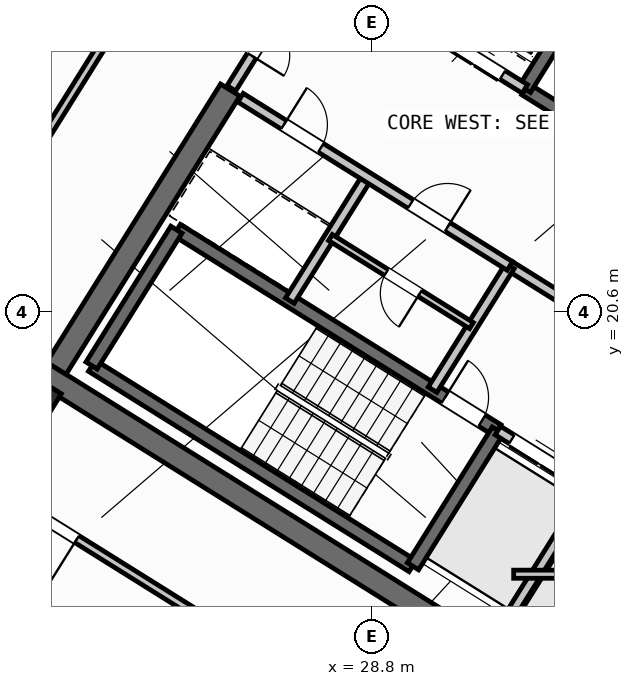
"""IFC4 building model, lengths in metres.
Left out: names, types, materials, properties, quantities, classifications, styles, units other than length and angle.
Written with IfcOpenShell. Run it as: python <this file> out.ifc"""

import sys

from ifc_helpers import new_model, si_unit, direction, frame, frame_2d, origin, origin_2d, place, context, subcontext, project, spatial, rectangle, hollow_rectangle, extrude, source, transform, mapped, element, fill, save


model = new_model("IFC4")
c1 = context("Model", 3, precision=1e-05, world=origin(), true_north=direction((0.0, 1.0)))
c2 = subcontext(c1, "Body", "Model", "MODEL_VIEW")
j1 = project(units=[si_unit("LENGTHUNIT", "METRE"), si_unit("PLANEANGLEUNIT", "RADIAN")], contexts=[c1])
p1 = place(None, origin())
s1 = spatial("IfcSite", under=j1, at=p1, CompositionType="ELEMENT")
p2 = place(p1, origin())
s2 = spatial("IfcBuilding", under=s1, at=p2, CompositionType="ELEMENT")
p3 = place(p2, frame((0.0, 0.0, 284.4)))
s3 = spatial("IfcBuildingStorey", under=s2, at=p3, CompositionType="ELEMENT", Elevation=284.4)
p4 = place(p3, frame((40.531, 24.036, 0.0), z_axis=(0.0, 0.0, 1.0), x_axis=(-0.848048787466, 0.529918157905, 0.0)))
e1 = element("IfcWall", 1, at=p4, inside=s3, PredefinedType="SHEAR", context=c2, shape_type="SweptSolid", body=[
    extrude(rectangle(XDim=13.04, YDim=0.45, at=frame_2d((6.52, 0.0))), origin(), (0.0, 0.0, 1.0), 3.35),
])
p5 = place(p3, frame((33.324, 12.503, 0.0), z_axis=(0.0, 0.0, 1.0), x_axis=(-0.848043529849, 0.529926571782, 0.0)))
e2 = element("IfcWall", 2, at=p5, inside=s3, PredefinedType="SHEAR", context=c2, shape_type="SweptSolid", body=[
    extrude(rectangle(XDim=13.04, YDim=0.45, at=frame_2d((6.52, 0.0))), origin(), (0.0, 0.0, 1.0), 3.35),
])
p6 = place(p3, frame((26.007, 24.976, 0.0), z_axis=(0.0, 0.0, 1.0), x_axis=(-0.529931155655, -0.848040665456, 0.0)))
e3 = element("IfcWall", 3, at=p6, inside=s3, PredefinedType="SHEAR", context=c2, shape_type="SweptSolid", body=[
    extrude(rectangle(XDim=6.475, YDim=0.45, at=frame_2d((3.238, 0.0))), origin(), (0.0, 0.0, 1.0), 3.35),
])
m1 = source(origin(), c2, "Body", "SweptSolid", [
    extrude(hollow_rectangle(XDim=0.7, YDim=0.7, WallThickness=0.028, at=origin_2d()), origin(), (0.0, 0.0, 1.0), 3.6),
])
p7 = place(p3, frame((22.191, 18.87, 0.0), z_axis=(0.0, 0.0, 1.0), x_axis=(-0.848048096156, 0.529919264233, 0.0)))
e4 = element("IfcColumn", 4, at=p7, inside=s3, PredefinedType="COLUMN", context=c2, shape_type="MappedRepresentation", body=[
    mapped(m1, transform((0.0, 0.0, 0.0), scale=1.0)),
])
p8 = place(p3, frame((29.268, 6.429, 0.0), z_axis=(0.0, 0.0, 1.0), x_axis=(-0.848048398186, 0.529918780885, 0.0)))
e5 = element("IfcWall", 5, at=p8, inside=s3, PredefinedType="STANDARD", context=c2, shape_type="SweptSolid", body=[
    extrude(rectangle(XDim=25.188, YDim=0.32, at=frame_2d((12.594, 0.0))), origin(), (0.0, 0.0, 1.0), 3.35),
])
p9 = place(p8, frame((16.362, 0.0, 0.0)))
e6 = element("IfcOpeningElement", 6, at=p9, cuts=e5, PredefinedType="OPENING", context=c2, shape_type="SweptSolid", body=[
    extrude(rectangle(XDim=1.2, YDim=2.15, at=frame_2d((0.6, 1.075))), frame((0.0, 0.17, 0.0), z_axis=(0.0, -1.0, 0.0), x_axis=(1.0, 0.0, 0.0)), (0.0, 0.0, 1.0), 0.34),
])
p10 = place(p8, frame((3.859, 0.0, 0.9)))
e7 = element("IfcOpeningElement", 7, at=p10, cuts=e5, PredefinedType="OPENING", context=c2, shape_type="SweptSolid", body=[
    extrude(rectangle(XDim=1.65, YDim=1.45, at=frame_2d((0.825, 0.725))), frame((0.0, 0.17, 0.0), z_axis=(0.0, -1.0, 0.0), x_axis=(1.0, 0.0, 0.0)), (0.0, 0.0, 1.0), 0.34),
])
p11 = place(p8, frame((10.519, 0.0, 0.9)))
e8 = element("IfcOpeningElement", 8, at=p11, cuts=e5, PredefinedType="OPENING", context=c2, shape_type="SweptSolid", body=[
    extrude(rectangle(XDim=1.65, YDim=1.45, at=frame_2d((0.825, 0.725))), frame((0.0, 0.17, 0.0), z_axis=(0.0, -1.0, 0.0), x_axis=(1.0, 0.0, 0.0)), (0.0, 0.0, 1.0), 0.34),
])
p12 = place(p8, frame((19.841, 0.0, 0.95)))
e9 = element("IfcOpeningElement", 9, at=p12, cuts=e5, PredefinedType="OPENING", context=c2, shape_type="SweptSolid", body=[
    extrude(rectangle(XDim=1.95, YDim=1.35, at=frame_2d((0.975, 0.675))), frame((0.0, 0.17, 0.0), z_axis=(0.0, -1.0, 0.0), x_axis=(1.0, 0.0, 0.0)), (0.0, 0.0, 1.0), 0.34),
])
p13 = place(p8, frame((23.478, 0.0, 1.0)))
e10 = element("IfcOpeningElement", 10, at=p13, cuts=e5, PredefinedType="OPENING", context=c2, shape_type="SweptSolid", body=[
    extrude(rectangle(XDim=0.9, YDim=1.25, at=frame_2d((0.45, 0.625))), frame((0.0, 0.17, 0.0), z_axis=(0.0, -1.0, 0.0), x_axis=(1.0, 0.0, 0.0)), (0.0, 0.0, 1.0), 0.34),
])
p14 = place(p3, frame((19.566, 38.434, 0.0), z_axis=(0.0, 0.0, 1.0), x_axis=(0.84804567626, -0.529923136858, 0.0)))
e11 = element("IfcWall", 11, at=p14, inside=s3, PredefinedType="STANDARD", context=c2, shape_type="SweptSolid", body=[
    extrude(rectangle(XDim=25.188, YDim=0.32, at=frame_2d((12.594, 0.0))), origin(), (0.0, 0.0, 1.0), 3.35),
])
p15 = place(p14, frame((3.355, 0.0, 0.0)))
e12 = element("IfcOpeningElement", 12, at=p15, cuts=e11, PredefinedType="OPENING", context=c2, shape_type="SweptSolid", body=[
    extrude(rectangle(XDim=1.05, YDim=2.15, at=frame_2d((0.525, 1.075))), frame((0.0, 0.17, 0.0), z_axis=(0.0, -1.0, 0.0), x_axis=(1.0, 0.0, 0.0)), (0.0, 0.0, 1.0), 0.34),
])
p16 = place(p14, frame((0.939, 0.0, 0.9)))
e13 = element("IfcOpeningElement", 13, at=p16, cuts=e11, PredefinedType="OPENING", context=c2, shape_type="SweptSolid", body=[
    extrude(rectangle(XDim=1.65, YDim=1.45, at=frame_2d((0.825, 0.725))), frame((0.0, 0.17, 0.0), z_axis=(0.0, -1.0, 0.0), x_axis=(1.0, 0.0, 0.0)), (0.0, 0.0, 1.0), 0.34),
])
p17 = place(p14, frame((7.499, 0.0, 0.9)))
e14 = element("IfcOpeningElement", 14, at=p17, cuts=e11, PredefinedType="OPENING", context=c2, shape_type="SweptSolid", body=[
    extrude(rectangle(XDim=1.35, YDim=1.45, at=frame_2d((0.675, 0.725))), frame((0.0, 0.17, 0.0), z_axis=(0.0, -1.0, 0.0), x_axis=(1.0, 0.0, 0.0)), (0.0, 0.0, 1.0), 0.34),
])
p18 = place(p14, frame((10.754, 0.0, 1.0)))
e15 = element("IfcOpeningElement", 15, at=p18, cuts=e11, PredefinedType="OPENING", context=c2, shape_type="SweptSolid", body=[
    extrude(rectangle(XDim=0.9, YDim=1.25, at=frame_2d((0.45, 0.625))), frame((0.0, 0.17, 0.0), z_axis=(0.0, -1.0, 0.0), x_axis=(1.0, 0.0, 0.0)), (0.0, 0.0, 1.0), 0.34),
])
p19 = place(p14, frame((15.694, 0.0, 1.0)))
e16 = element("IfcOpeningElement", 16, at=p19, cuts=e11, PredefinedType="OPENING", context=c2, shape_type="SweptSolid", body=[
    extrude(rectangle(XDim=0.9, YDim=1.25, at=frame_2d((0.45, 0.625))), frame((0.0, 0.17, 0.0), z_axis=(0.0, -1.0, 0.0), x_axis=(1.0, 0.0, 0.0)), (0.0, 0.0, 1.0), 0.34),
])
p20 = place(p14, frame((21.394, 0.0, 1.0)))
e17 = element("IfcOpeningElement", 17, at=p20, cuts=e11, PredefinedType="OPENING", context=c2, shape_type="SweptSolid", body=[
    extrude(rectangle(XDim=0.9, YDim=1.25, at=frame_2d((0.45, 0.625))), frame((0.0, 0.17, 0.0), z_axis=(0.0, -1.0, 0.0), x_axis=(1.0, 0.0, 0.0)), (0.0, 0.0, 1.0), 0.34),
])
p21 = place(p3, frame((29.605, 15.581, 0.0), z_axis=(0.0, 0.0, 1.0), x_axis=(-0.848036911448, 0.529937163087, 0.0)))
e18 = element("IfcWall", 18, at=p21, inside=s3, PredefinedType="SHEAR", context=c2, shape_type="SweptSolid", body=[
    extrude(rectangle(XDim=7.46, YDim=0.26, at=frame_2d((3.73, 0.0))), origin(), (0.0, 0.0, 1.0), 3.35),
])
p22 = place(p3, frame((31.28, 18.261, 0.0), z_axis=(0.0, 0.0, 1.0), x_axis=(-0.848051618787, 0.529913626805, 0.0)))
e19 = element("IfcWall", 19, at=p22, inside=s3, PredefinedType="SHEAR", context=c2, shape_type="SweptSolid", body=[
    extrude(rectangle(XDim=7.46, YDim=0.26, at=frame_2d((3.73, 0.0))), origin(), (0.0, 0.0, 1.0), 3.35),
])
p23 = place(p22, frame((0.36, 0.0, 0.0)))
e20 = element("IfcOpeningElement", 20, at=p23, cuts=e19, PredefinedType="OPENING", context=c2, shape_type="SweptSolid", body=[
    extrude(rectangle(XDim=0.86, YDim=2.05, at=frame_2d((0.43, 1.025))), frame((0.0, 0.14, 0.0), z_axis=(0.0, -1.0, 0.0), x_axis=(1.0, 0.0, 0.0)), (0.0, 0.0, 1.0), 0.28),
])
p24 = place(p3, frame((31.288, 18.256, 0.0), z_axis=(0.0, 0.0, 1.0), x_axis=(-0.529943379326, -0.848033026897, 0.0)))
e21 = element("IfcWall", 21, at=p24, inside=s3, PredefinedType="SHEAR", context=c2, shape_type="SweptSolid", body=[
    extrude(rectangle(XDim=3.16, YDim=0.26, at=frame_2d((1.58, 0.0))), origin(), (0.0, 0.0, 1.0), 3.35),
])
p25 = place(p3, frame((24.945, 22.22, 0.0), z_axis=(0.0, 0.0, 1.0), x_axis=(-0.529908658664, -0.84805472316, 0.0)))
e22 = element("IfcWall", 22, at=p25, inside=s3, PredefinedType="SHEAR", context=c2, shape_type="SweptSolid", body=[
    extrude(rectangle(XDim=3.16, YDim=0.26, at=frame_2d((1.58, 0.0))), origin(), (0.0, 0.0, 1.0), 3.35),
])
p26 = place(p3, frame((38.046, 21.108, 0.0), z_axis=(0.0, 0.0, 1.0), x_axis=(-0.848054434086, 0.529909121291, 0.0)))
e23 = element("IfcWall", 23, at=p26, inside=s3, PredefinedType="SHEAR", context=c2, shape_type="SweptSolid", body=[
    extrude(rectangle(XDim=7.33, YDim=0.26, at=frame_2d((3.665, 0.0))), origin(), (0.0, 0.0, 1.0), 3.35),
])
p27 = place(p26, frame((0.22, 0.0, 0.0)))
e24 = element("IfcOpeningElement", 24, at=p27, cuts=e23, PredefinedType="OPENING", context=c2, shape_type="SweptSolid", body=[
    extrude(rectangle(XDim=1.1, YDim=2.1, at=frame_2d((0.55, 1.05))), frame((0.0, 0.14, 0.0), z_axis=(0.0, -1.0, 0.0), x_axis=(1.0, 0.0, 0.0)), (0.0, 0.0, 1.0), 0.28),
])
p28 = place(p3, frame((33.496, 27.677, 0.0), z_axis=(0.0, 0.0, 1.0), x_axis=(-0.529908658664, -0.84805472316, 0.0)))
e25 = element("IfcWall", 25, at=p28, inside=s3, PredefinedType="SHEAR", context=c2, shape_type="SweptSolid", body=[
    extrude(rectangle(XDim=3.16, YDim=0.26, at=frame_2d((1.58, 0.0))), origin(), (0.0, 0.0, 1.0), 3.35),
])
p29 = place(p3, frame((34.933, 15.978, 0.0), z_axis=(0.0, 0.0, 1.0), x_axis=(-0.848055739377, 0.529907032327, 0.0)))
e26 = element("IfcWall", 26, at=p29, inside=s3, PredefinedType="STANDARD", context=c2, shape_type="SweptSolid", body=[
    extrude(rectangle(XDim=4.298, YDim=0.2, at=frame_2d((2.149, 0.0))), origin(), (0.0, 0.0, 1.0), 3.34),
])
p30 = place(p29, frame((0.448, 0.0, 0.0)))
e27 = element("IfcOpeningElement", 27, at=p30, cuts=e26, PredefinedType="OPENING", context=c2, shape_type="SweptSolid", body=[
    extrude(rectangle(XDim=1.3, YDim=2.2, at=frame_2d((0.65, 1.1))), frame((0.0, 0.11, 0.0), z_axis=(0.0, -1.0, 0.0), x_axis=(1.0, 0.0, 0.0)), (0.0, 0.0, 1.0), 0.22),
])
p31 = place(p29, frame((2.523, 0.0, 0.0)))
e28 = element("IfcOpeningElement", 28, at=p31, cuts=e26, PredefinedType="OPENING", context=c2, shape_type="SweptSolid", body=[
    extrude(rectangle(XDim=1.45, YDim=2.25, at=frame_2d((0.725, 1.125))), frame((0.0, 0.11, 0.0), z_axis=(0.0, -1.0, 0.0), x_axis=(1.0, 0.0, 0.0)), (0.0, 0.0, 1.0), 0.22),
])
p32 = place(p3, frame((36.459, 18.421, 0.0), z_axis=(0.0, 0.0, 1.0), x_axis=(-0.848059591691, 0.529900867089, 0.0)))
e29 = element("IfcWall", 29, at=p32, inside=s3, PredefinedType="STANDARD", context=c2, shape_type="SweptSolid", body=[
    extrude(rectangle(XDim=5.818, YDim=0.2, at=frame_2d((2.909, 0.0))), origin(), (0.0, 0.0, 1.0), 3.34),
])
p33 = place(p32, frame((2.598, 0.0, 0.0)))
e30 = element("IfcOpeningElement", 30, at=p33, cuts=e29, PredefinedType="OPENING", context=c2, shape_type="SweptSolid", body=[
    extrude(rectangle(XDim=1.15, YDim=2.1, at=frame_2d((0.575, 1.05))), frame((0.0, 0.11, 0.0), z_axis=(0.0, -1.0, 0.0), x_axis=(1.0, 0.0, 0.0)), (0.0, 0.0, 1.0), 0.22),
])
p34 = place(p3, frame((31.822, 24.998, 0.0), z_axis=(0.0, 0.0, 1.0), x_axis=(-0.848054125777, 0.529909614701, 0.0)))
e31 = element("IfcWall", 31, at=p34, inside=s3, PredefinedType="STANDARD", context=c2, shape_type="SweptSolid", body=[
    extrude(rectangle(XDim=4.668, YDim=0.2, at=frame_2d((2.334, 0.0))), origin(), (0.0, 0.0, 1.0), 3.34),
])
p35 = place(p34, frame((0.52, 0.0, 0.0)))
e32 = element("IfcOpeningElement", 32, at=p35, cuts=e31, PredefinedType="OPENING", context=c2, shape_type="SweptSolid", body=[
    extrude(rectangle(XDim=1.2, YDim=2.15, at=frame_2d((0.6, 1.075))), frame((0.0, 0.11, 0.0), z_axis=(0.0, -1.0, 0.0), x_axis=(1.0, 0.0, 0.0)), (0.0, 0.0, 1.0), 0.22),
])
p36 = place(p34, frame((2.54, 0.0, 0.0)))
e33 = element("IfcOpeningElement", 33, at=p36, cuts=e31, PredefinedType="OPENING", context=c2, shape_type="SweptSolid", body=[
    extrude(rectangle(XDim=1.2, YDim=2.15, at=frame_2d((0.6, 1.075))), frame((0.0, 0.11, 0.0), z_axis=(0.0, -1.0, 0.0), x_axis=(1.0, 0.0, 0.0)), (0.0, 0.0, 1.0), 0.22),
])
p37 = place(p3, frame((33.029, 17.003, 0.0), z_axis=(0.0, 0.0, 1.0), x_axis=(-0.529916267533, -0.848049968695, 0.0)))
e34 = element("IfcWall", 34, at=p37, inside=s3, PredefinedType="STANDARD", context=c2, shape_type="SweptSolid", body=[
    extrude(rectangle(XDim=2.92, YDim=0.2, at=frame_2d((1.46, 0.0))), origin(), (0.0, 0.0, 1.0), 3.34),
])
for number, where, z_axis, x_axis in (
    (35, (31.525, 21.504, 0.0), (0.0, 0.0, 1.0), (-0.53, -0.848, 0.0)),
    (36, (28.71, 23.263, 0.0), (0.0, 0.0, 1.0), (-0.53, -0.848, 0.0)),
):
    element("IfcWall", number, at=place(p3, frame(where, z_axis=z_axis, x_axis=x_axis)), inside=s3, PredefinedType="STANDARD", context=c2, shape_type="SweptSolid", body=[
        extrude(rectangle(XDim=2.88, YDim=0.2, at=frame_2d((1.44, 0.0))), origin(), (0.0, 0.0, 1.0), 3.34),
    ])
p38 = place(p3, frame((31.525, 21.504, 0.0), z_axis=(0.0, 0.0, 1.0), x_axis=(-0.848042066329, 0.529928913853, 0.0)))
e37 = element("IfcWall", 37, at=p38, inside=s3, PredefinedType="STANDARD", context=c2, shape_type="SweptSolid", body=[
    extrude(rectangle(XDim=6.268, YDim=0.2, at=frame_2d((3.134, 0.0))), origin(), (0.0, 0.0, 1.0), 3.34),
])
p39 = place(p38, frame((4.4, 0.0, 0.0)))
e38 = element("IfcOpeningElement", 38, at=p39, cuts=e37, PredefinedType="OPENING", context=c2, shape_type="SweptSolid", body=[
    extrude(rectangle(XDim=0.86, YDim=2.05, at=frame_2d((0.43, 1.025))), frame((0.0, 0.11, 0.0), z_axis=(0.0, -1.0, 0.0), x_axis=(1.0, 0.0, 0.0)), (0.0, 0.0, 1.0), 0.22),
])
p40 = place(p38, frame((1.45, 0.0, 0.0)))
e39 = element("IfcOpeningElement", 39, at=p40, cuts=e37, PredefinedType="OPENING", context=c2, shape_type="SweptSolid", body=[
    extrude(rectangle(XDim=0.86, YDim=2.05, at=frame_2d((0.43, 1.025))), frame((0.0, 0.11, 0.0), z_axis=(0.0, -1.0, 0.0), x_axis=(1.0, 0.0, 0.0)), (0.0, 0.0, 1.0), 0.22),
])
p41 = place(p3, frame((30.766, 20.327, 0.0), z_axis=(0.0, 0.0, 1.0), x_axis=(-0.848052663127, 0.529911955482, 0.0)))
e40 = element("IfcWall", 40, at=p41, inside=s3, PredefinedType="PLUMBINGWALL", context=c2, shape_type="SweptSolid", body=[
    extrude(rectangle(XDim=3.28, YDim=0.14, at=frame_2d((1.64, 0.0))), origin(), (0.0, 0.0, 1.0), 3.34),
])
p42 = place(p41, frame((1.2, 0.0, 0.0)))
e41 = element("IfcOpeningElement", 41, at=p42, cuts=e40, PredefinedType="OPENING", context=c2, shape_type="SweptSolid", body=[
    extrude(rectangle(XDim=0.78, YDim=2.05, at=frame_2d((0.39, 1.025))), frame((0.0, 0.08, 0.0), z_axis=(0.0, -1.0, 0.0), x_axis=(1.0, 0.0, 0.0)), (0.0, 0.0, 1.0), 0.16),
])
p43 = place(p3, frame((27.596, 27.52, 0.0), z_axis=(0.0, 0.0, 1.0), x_axis=(-0.529865479138, -0.848081702443, 0.0)))
e42 = element("IfcWall", 42, at=p43, inside=s3, PredefinedType="STANDARD", context=c2, shape_type="SweptSolid", body=[
    extrude(rectangle(XDim=2.96, YDim=0.2, at=frame_2d((1.48, 0.0))), origin(), (0.0, 0.0, 1.0), 3.34),
])
p44 = place(p43, frame((0.7, 0.0, 0.0)))
e43 = element("IfcOpeningElement", 43, at=p44, cuts=e42, PredefinedType="OPENING", context=c2, shape_type="SweptSolid", body=[
    extrude(rectangle(XDim=1.5, YDim=2.15, at=frame_2d((0.75, 1.075))), frame((0.0, 0.11, 0.0), z_axis=(0.0, -1.0, 0.0), x_axis=(1.0, 0.0, 0.0)), (0.0, 0.0, 1.0), 0.22),
])
p45 = place(p3, frame((25.807, 29.582, 0.0), z_axis=(0.0, 0.0, 1.0), x_axis=(-0.529918119251, -0.84804881162, 0.0)))
e44 = element("IfcWall", 44, at=p45, inside=s3, PredefinedType="PARTITIONING", context=c2, shape_type="SweptSolid", body=[
    extrude(rectangle(XDim=17.65, YDim=0.16, at=frame_2d((8.825, 0.0))), origin(), (0.0, 0.0, 1.0), 3.34),
])
p46 = place(p3, frame((32.164, 10.374, 0.0), z_axis=(0.0, 0.0, 1.0), x_axis=(-0.848044107957, 0.529925646633, 0.0)))
e45 = element("IfcWall", 45, at=p46, inside=s3, PredefinedType="PARTITIONING", context=c2, shape_type="SweptSolid", body=[
    extrude(rectangle(XDim=15.57, YDim=0.16, at=frame_2d((7.785, 0.0))), origin(), (0.0, 0.0, 1.0), 3.34),
])
p47 = place(p46, frame((10.83, 0.0, 0.0)))
e46 = element("IfcOpeningElement", 46, at=p47, cuts=e45, PredefinedType="OPENING", context=c2, shape_type="SweptSolid", body=[
    extrude(rectangle(XDim=1.0, YDim=2.1, at=frame_2d((0.5, 1.05))), frame((0.0, 0.09, 0.0), z_axis=(0.0, -1.0, 0.0), x_axis=(1.0, 0.0, 0.0)), (0.0, 0.0, 1.0), 0.18),
])
p48 = place(p3, frame((29.72, 8.859, 0.0), z_axis=(0.0, 0.0, 1.0), x_axis=(-0.848049134363, 0.529917602752, 0.0)))
e47 = element("IfcWall", 47, at=p48, inside=s3, PredefinedType="PLUMBINGWALL", context=c2, shape_type="SweptSolid", body=[
    extrude(rectangle(XDim=14.3, YDim=0.14, at=frame_2d((7.15, 0.0))), origin(), (0.0, 0.0, 1.0), 3.34),
])
p49 = place(p48, frame((9.57, 0.0, 0.0)))
e48 = element("IfcOpeningElement", 48, at=p49, cuts=e47, PredefinedType="OPENING", context=c2, shape_type="SweptSolid", body=[
    extrude(rectangle(XDim=0.92, YDim=2.08, at=frame_2d((0.46, 1.04))), frame((0.0, 0.08, 0.0), z_axis=(0.0, -1.0, 0.0), x_axis=(1.0, 0.0, 0.0)), (0.0, 0.0, 1.0), 0.16),
])
p50 = place(p3, frame((31.6, 15.42, 0.0), z_axis=(0.0, 0.0, 1.0), x_axis=(1.0, 0.0, 0.0)))
e49 = element("IfcWall", 49, at=p50, inside=s3, PredefinedType="PARTITIONING", context=c2, shape_type="SweptSolid", body=[
    extrude(rectangle(XDim=2.984, YDim=0.16, at=frame_2d((1.492, 0.0))), origin(), (0.0, 0.0, 1.0), 3.34),
])
m2 = source(origin(), c2, "Body", "SweptSolid", [
    extrude(rectangle(XDim=0.86, YDim=2.05, at=frame_2d((0.43, 1.025))), frame((0.0, 0.025, 0.0), z_axis=(0.0, -1.0, 0.0), x_axis=(1.0, 0.0, 0.0)), (0.0, 0.0, 1.0), 0.05),
])
p51 = place(p23, frame((0.86, 0.0, 0.0), z_axis=(0.0, 0.0, 1.0), x_axis=(-1.0, 0.0, 0.0)))
e50 = element("IfcDoor", 50, at=p51, inside=s3, OperationType="SINGLE_SWING_LEFT", PredefinedType="DOOR", context=c2, shape_type="MappedRepresentation", body=[
    mapped(m2, transform((0.0, 0.0, 0.0), scale=1.0)),
])
fill(e20, e50)
m3 = source(origin(), c2, "Body", "SweptSolid", [
    extrude(rectangle(XDim=1.45, YDim=2.25, at=frame_2d((0.725, 1.125))), frame((0.0, 0.025, 0.0), z_axis=(0.0, -1.0, 0.0), x_axis=(1.0, 0.0, 0.0)), (0.0, 0.0, 1.0), 0.05),
])
p52 = place(p31, origin())
e51 = element("IfcDoor", 51, at=p52, inside=s3, OperationType="DOUBLE_DOOR_SLIDING", PredefinedType="DOOR", context=c2, shape_type="MappedRepresentation", body=[
    mapped(m3, transform((0.0, 0.0, 0.0), scale=1.0)),
])
fill(e28, e51)
m4 = source(origin(), c2, "Body", "SweptSolid", [
    extrude(rectangle(XDim=1.2, YDim=2.15, at=frame_2d((0.6, 1.075))), frame((0.0, 0.025, 0.0), z_axis=(0.0, -1.0, 0.0), x_axis=(1.0, 0.0, 0.0)), (0.0, 0.0, 1.0), 0.05),
])
p53 = place(p35, origin())
e52 = element("IfcDoor", 52, at=p53, inside=s3, OperationType="DOUBLE_DOOR_SLIDING", PredefinedType="DOOR", context=c2, shape_type="MappedRepresentation", body=[
    mapped(m4, transform((0.0, 0.0, 0.0), scale=1.0)),
])
fill(e32, e52)
p54 = place(p39, frame((0.86, 0.0, 0.0), z_axis=(0.0, 0.0, 1.0), x_axis=(-1.0, 0.0, 0.0)))
e53 = element("IfcDoor", 53, at=p54, inside=s3, OperationType="SINGLE_SWING_LEFT", PredefinedType="DOOR", context=c2, shape_type="MappedRepresentation", body=[
    mapped(m2, transform((0.0, 0.0, 0.0), scale=1.0)),
])
fill(e38, e53)
p55 = place(p40, frame((0.86, 0.0, 0.0), z_axis=(0.0, 0.0, 1.0), x_axis=(-1.0, 0.0, 0.0)))
e54 = element("IfcDoor", 54, at=p55, inside=s3, OperationType="SINGLE_SWING_RIGHT", PredefinedType="DOOR", context=c2, shape_type="MappedRepresentation", body=[
    mapped(m2, transform((0.0, 0.0, 0.0), scale=1.0)),
])
fill(e39, e54)
m5 = source(origin(), c2, "Body", "SweptSolid", [
    extrude(rectangle(XDim=0.78, YDim=2.05, at=frame_2d((0.39, 1.025))), frame((0.0, 0.025, 0.0), z_axis=(0.0, -1.0, 0.0), x_axis=(1.0, 0.0, 0.0)), (0.0, 0.0, 1.0), 0.05),
])
p56 = place(p42, origin())
e55 = element("IfcDoor", 55, at=p56, inside=s3, OperationType="SINGLE_SWING_LEFT", PredefinedType="DOOR", context=c2, shape_type="MappedRepresentation", body=[
    mapped(m5, transform((0.0, 0.0, 0.0), scale=1.0)),
])
fill(e41, e55)
m6 = source(origin(), c2, "Body", "SweptSolid", [
    extrude(rectangle(XDim=1.5, YDim=2.15, at=frame_2d((0.75, 1.075))), frame((0.0, 0.025, 0.0), z_axis=(0.0, -1.0, 0.0), x_axis=(1.0, 0.0, 0.0)), (0.0, 0.0, 1.0), 0.05),
])
p57 = place(p44, origin())
e56 = element("IfcDoor", 56, at=p57, inside=s3, OperationType="DOUBLE_DOOR_SINGLE_SWING", PredefinedType="DOOR", context=c2, shape_type="MappedRepresentation", body=[
    mapped(m6, transform((0.0, 0.0, 0.0), scale=1.0)),
])
fill(e43, e56)
m7 = source(origin(), c2, "Body", "SweptSolid", [
    extrude(rectangle(XDim=1.0, YDim=2.1, at=frame_2d((0.5, 1.05))), frame((0.0, 0.025, 0.0), z_axis=(0.0, -1.0, 0.0), x_axis=(1.0, 0.0, 0.0)), (0.0, 0.0, 1.0), 0.05),
])
p58 = place(p47, origin())
e57 = element("IfcDoor", 57, at=p58, inside=s3, OperationType="SINGLE_SWING_LEFT", PredefinedType="DOOR", context=c2, shape_type="MappedRepresentation", body=[
    mapped(m7, transform((0.0, 0.0, 0.0), scale=1.0)),
])
fill(e46, e57)
save(model, sys.argv[1])
